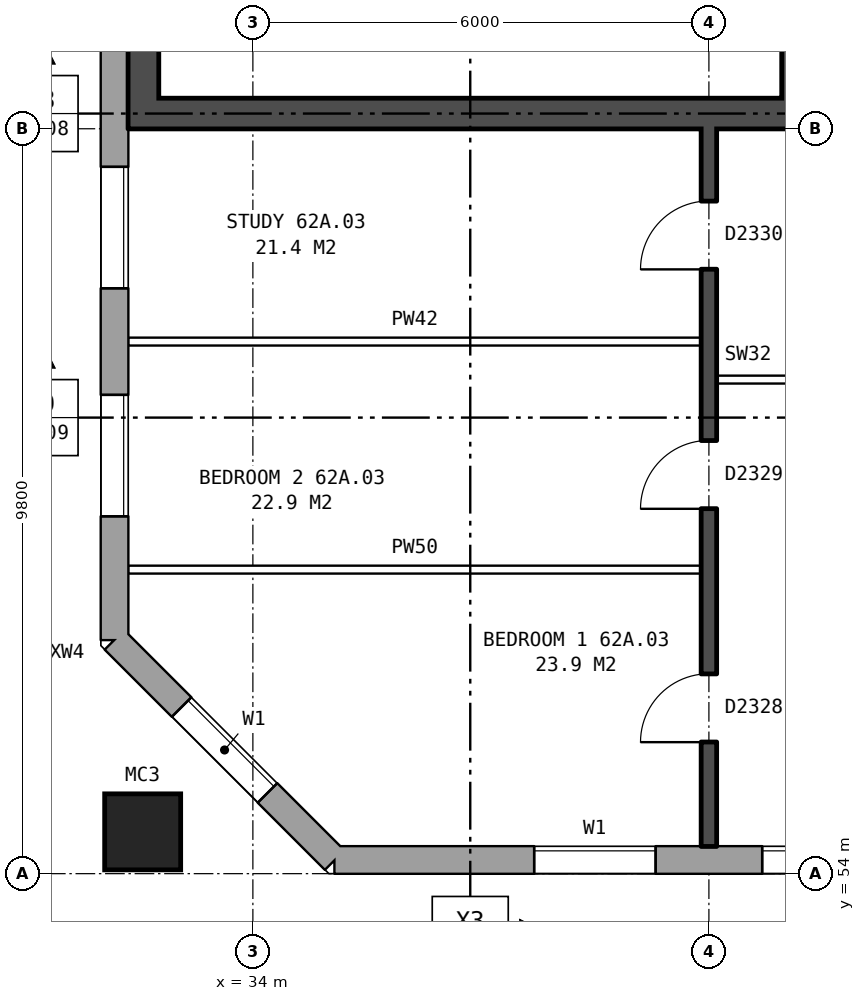
"""IFC4 building model, lengths in metres.
Left out: names, types, materials, properties, quantities, classifications, styles, units other than length and angle.
Written with IfcOpenShell. Run it as: python <this file> out.ifc"""

import sys

from ifc_helpers import new_model, si_unit, direction, frame, frame_2d, origin, origin_2d, place, context, subcontext, project, spatial, rectangle, hollow_rectangle, extrude, element, fill, save


model = new_model("IFC4")
c1 = context("Model", 3, precision=1e-05, world=origin(), true_north=direction((0.0, 1.0)))
c2 = subcontext(c1, "Body", "Model", "MODEL_VIEW")
j1 = project(units=[si_unit("LENGTHUNIT", "METRE"), si_unit("PLANEANGLEUNIT", "RADIAN")], contexts=[c1])
p1 = place(None, origin())
s1 = spatial("IfcSite", under=j1, at=p1, CompositionType="ELEMENT")
p2 = place(p1, origin())
s2 = spatial("IfcBuilding", under=s1, at=p2, CompositionType="ELEMENT")
p3 = place(p2, frame((0.0, 0.0, 221.4)))
s3 = spatial("IfcBuildingStorey", under=s2, at=p3, CompositionType="ELEMENT", Elevation=221.4)
p4 = place(p3, frame((32.55, 54.55, 0.0), z_axis=(0.0, 0.0, 1.0), x_axis=(1.0, 0.0, 0.0)))
e1 = element("IfcColumn", 1, at=p4, inside=s3, PredefinedType="COLUMN", context=c2, shape_type="SweptSolid", body=[
    extrude(hollow_rectangle(XDim=1.0, YDim=1.0, WallThickness=0.055, at=origin_2d()), origin(), (0.0, 0.0, 1.0), 3.1),
])
p5 = place(p3, frame((32.18, 57.075, 0.0), z_axis=(0.0, 0.0, 1.0), x_axis=(0.707106781187, -0.707106781187, 0.0)))
e2 = element("IfcWall", 2, at=p5, inside=s3, PredefinedType="STANDARD", context=c2, shape_type="SweptSolid", body=[
    extrude(rectangle(XDim=4.094, YDim=0.36, at=frame_2d((2.047, 0.0))), origin(), (0.0, 0.0, 1.0), 2.85),
])
p6 = place(p5, frame((1.247, 0.0, 0.8)))
e3 = element("IfcOpeningElement", 3, at=p6, cuts=e2, PredefinedType="OPENING", context=c2, shape_type="SweptSolid", body=[
    extrude(rectangle(XDim=1.6, YDim=1.8, at=frame_2d((0.8, 0.9))), frame((0.0, 0.19, 0.0), z_axis=(0.0, -1.0, 0.0), x_axis=(1.0, 0.0, 0.0)), (0.0, 0.0, 1.0), 0.38),
])
p7 = place(p3, frame((35.075, 54.18, 0.0), z_axis=(0.0, 0.0, 1.0), x_axis=(1.0, 0.0, 0.0)))
e4 = element("IfcWall", 4, at=p7, inside=s3, PredefinedType="STANDARD", context=c2, shape_type="SweptSolid", body=[
    extrude(rectangle(XDim=39.875, YDim=0.36, at=frame_2d((19.938, 0.0))), origin(), (0.0, 0.0, 1.0), 2.85),
])
p8 = place(p7, frame((2.625, 0.0, 0.8)))
e5 = element("IfcOpeningElement", 5, at=p8, cuts=e4, PredefinedType="OPENING", context=c2, shape_type="SweptSolid", body=[
    extrude(rectangle(XDim=1.6, YDim=1.8, at=frame_2d((0.8, 0.9))), frame((0.0, 0.19, 0.0), z_axis=(0.0, -1.0, 0.0), x_axis=(1.0, 0.0, 0.0)), (0.0, 0.0, 1.0), 0.38),
])
p9 = place(p7, frame((5.625, 0.0, 0.8)))
e6 = element("IfcOpeningElement", 6, at=p9, cuts=e4, PredefinedType="OPENING", context=c2, shape_type="SweptSolid", body=[
    extrude(rectangle(XDim=1.6, YDim=1.8, at=frame_2d((0.8, 0.9))), frame((0.0, 0.19, 0.0), z_axis=(0.0, -1.0, 0.0), x_axis=(1.0, 0.0, 0.0)), (0.0, 0.0, 1.0), 0.38),
])
p10 = place(p7, frame((7.525, 0.0, 0.8)))
e7 = element("IfcOpeningElement", 7, at=p10, cuts=e4, PredefinedType="OPENING", context=c2, shape_type="SweptSolid", body=[
    extrude(rectangle(XDim=1.4, YDim=1.8, at=frame_2d((0.7, 0.9))), frame((0.0, 0.19, 0.0), z_axis=(0.0, -1.0, 0.0), x_axis=(1.0, 0.0, 0.0)), (0.0, 0.0, 1.0), 0.38),
])
p11 = place(p7, frame((11.625, 0.0, 0.8)))
e8 = element("IfcOpeningElement", 8, at=p11, cuts=e4, PredefinedType="OPENING", context=c2, shape_type="SweptSolid", body=[
    extrude(rectangle(XDim=1.6, YDim=1.8, at=frame_2d((0.8, 0.9))), frame((0.0, 0.19, 0.0), z_axis=(0.0, -1.0, 0.0), x_axis=(1.0, 0.0, 0.0)), (0.0, 0.0, 1.0), 0.38),
])
p12 = place(p7, frame((14.625, 0.0, 0.8)))
e9 = element("IfcOpeningElement", 9, at=p12, cuts=e4, PredefinedType="OPENING", context=c2, shape_type="SweptSolid", body=[
    extrude(rectangle(XDim=1.6, YDim=1.8, at=frame_2d((0.8, 0.9))), frame((0.0, 0.19, 0.0), z_axis=(0.0, -1.0, 0.0), x_axis=(1.0, 0.0, 0.0)), (0.0, 0.0, 1.0), 0.38),
])
p13 = place(p7, frame((17.625, 0.0, 0.8)))
e10 = element("IfcOpeningElement", 10, at=p13, cuts=e4, PredefinedType="OPENING", context=c2, shape_type="SweptSolid", body=[
    extrude(rectangle(XDim=1.6, YDim=1.8, at=frame_2d((0.8, 0.9))), frame((0.0, 0.19, 0.0), z_axis=(0.0, -1.0, 0.0), x_axis=(1.0, 0.0, 0.0)), (0.0, 0.0, 1.0), 0.38),
])
p14 = place(p7, frame((20.625, 0.0, 0.8)))
e11 = element("IfcOpeningElement", 11, at=p14, cuts=e4, PredefinedType="OPENING", context=c2, shape_type="SweptSolid", body=[
    extrude(rectangle(XDim=1.6, YDim=1.8, at=frame_2d((0.8, 0.9))), frame((0.0, 0.19, 0.0), z_axis=(0.0, -1.0, 0.0), x_axis=(1.0, 0.0, 0.0)), (0.0, 0.0, 1.0), 0.38),
])
p15 = place(p7, frame((23.625, 0.0, 0.8)))
e12 = element("IfcOpeningElement", 12, at=p15, cuts=e4, PredefinedType="OPENING", context=c2, shape_type="SweptSolid", body=[
    extrude(rectangle(XDim=1.6, YDim=1.8, at=frame_2d((0.8, 0.9))), frame((0.0, 0.19, 0.0), z_axis=(0.0, -1.0, 0.0), x_axis=(1.0, 0.0, 0.0)), (0.0, 0.0, 1.0), 0.38),
])
p16 = place(p7, frame((26.075, 0.0, 0.15)))
e13 = element("IfcOpeningElement", 13, at=p16, cuts=e4, PredefinedType="OPENING", context=c2, shape_type="SweptSolid", body=[
    extrude(rectangle(XDim=0.8, YDim=1.5, at=frame_2d((0.4, 0.75))), frame((0.0, 0.19, 0.0), z_axis=(0.0, -1.0, 0.0), x_axis=(1.0, 0.0, 0.0)), (0.0, 0.0, 1.0), 0.38),
])
p17 = place(p7, frame((29.625, 0.0, 0.8)))
e14 = element("IfcOpeningElement", 14, at=p17, cuts=e4, PredefinedType="OPENING", context=c2, shape_type="SweptSolid", body=[
    extrude(rectangle(XDim=1.6, YDim=1.8, at=frame_2d((0.8, 0.9))), frame((0.0, 0.19, 0.0), z_axis=(0.0, -1.0, 0.0), x_axis=(1.0, 0.0, 0.0)), (0.0, 0.0, 1.0), 0.38),
])
p18 = place(p7, frame((32.625, 0.0, 0.8)))
e15 = element("IfcOpeningElement", 15, at=p18, cuts=e4, PredefinedType="OPENING", context=c2, shape_type="SweptSolid", body=[
    extrude(rectangle(XDim=1.6, YDim=1.8, at=frame_2d((0.8, 0.9))), frame((0.0, 0.19, 0.0), z_axis=(0.0, -1.0, 0.0), x_axis=(1.0, 0.0, 0.0)), (0.0, 0.0, 1.0), 0.38),
])
p19 = place(p7, frame((35.625, 0.0, 0.8)))
e16 = element("IfcOpeningElement", 16, at=p19, cuts=e4, PredefinedType="OPENING", context=c2, shape_type="SweptSolid", body=[
    extrude(rectangle(XDim=1.6, YDim=1.8, at=frame_2d((0.8, 0.9))), frame((0.0, 0.19, 0.0), z_axis=(0.0, -1.0, 0.0), x_axis=(1.0, 0.0, 0.0)), (0.0, 0.0, 1.0), 0.38),
])
p20 = place(p7, frame((9.225, 0.0, 1.7)))
e17 = element("IfcOpeningElement", 17, at=p20, cuts=e4, PredefinedType="OPENING", context=c2, shape_type="SweptSolid", body=[
    extrude(rectangle(XDim=0.6, YDim=0.9, at=frame_2d((0.3, 0.45))), frame((0.0, 0.19, 0.0), z_axis=(0.0, -1.0, 0.0), x_axis=(1.0, 0.0, 0.0)), (0.0, 0.0, 1.0), 0.38),
])
p21 = place(p7, frame((28.075, 0.0, 1.65)))
e18 = element("IfcOpeningElement", 18, at=p21, cuts=e4, PredefinedType="OPENING", context=c2, shape_type="SweptSolid", body=[
    extrude(rectangle(XDim=0.6, YDim=0.9, at=frame_2d((0.3, 0.45))), frame((0.0, 0.19, 0.0), z_axis=(0.0, -1.0, 0.0), x_axis=(1.0, 0.0, 0.0)), (0.0, 0.0, 1.0), 0.38),
])
p22 = place(p3, frame((32.18, 82.925, 0.0), z_axis=(0.0, 0.0, 1.0), x_axis=(0.0, -1.0, 0.0)))
e19 = element("IfcWall", 19, at=p22, inside=s3, PredefinedType="STANDARD", context=c2, shape_type="SweptSolid", body=[
    extrude(rectangle(XDim=25.851, YDim=0.36, at=frame_2d((12.925, 0.0))), origin(), (0.0, 0.0, 1.0), 2.85),
])
p23 = place(p22, frame((1.625, 0.0, 0.8)))
e20 = element("IfcOpeningElement", 20, at=p23, cuts=e19, PredefinedType="OPENING", context=c2, shape_type="SweptSolid", body=[
    extrude(rectangle(XDim=1.6, YDim=1.8, at=frame_2d((0.8, 0.9))), frame((0.0, 0.19, 0.0), z_axis=(0.0, -1.0, 0.0), x_axis=(1.0, 0.0, 0.0)), (0.0, 0.0, 1.0), 0.38),
])
p24 = place(p22, frame((4.625, 0.0, 0.8)))
e21 = element("IfcOpeningElement", 21, at=p24, cuts=e19, PredefinedType="OPENING", context=c2, shape_type="SweptSolid", body=[
    extrude(rectangle(XDim=1.6, YDim=1.8, at=frame_2d((0.8, 0.9))), frame((0.0, 0.19, 0.0), z_axis=(0.0, -1.0, 0.0), x_axis=(1.0, 0.0, 0.0)), (0.0, 0.0, 1.0), 0.38),
])
p25 = place(p22, frame((19.625, 0.0, 0.8)))
e22 = element("IfcOpeningElement", 22, at=p25, cuts=e19, PredefinedType="OPENING", context=c2, shape_type="SweptSolid", body=[
    extrude(rectangle(XDim=1.6, YDim=1.8, at=frame_2d((0.8, 0.9))), frame((0.0, 0.19, 0.0), z_axis=(0.0, -1.0, 0.0), x_axis=(1.0, 0.0, 0.0)), (0.0, 0.0, 1.0), 0.38),
])
p26 = place(p22, frame((22.625, 0.0, 0.8)))
e23 = element("IfcOpeningElement", 23, at=p26, cuts=e19, PredefinedType="OPENING", context=c2, shape_type="SweptSolid", body=[
    extrude(rectangle(XDim=1.6, YDim=1.8, at=frame_2d((0.8, 0.9))), frame((0.0, 0.19, 0.0), z_axis=(0.0, -1.0, 0.0), x_axis=(1.0, 0.0, 0.0)), (0.0, 0.0, 1.0), 0.38),
])
p27 = place(p3, frame((41.16, 76.2, 0.0), z_axis=(0.0, 0.0, 1.0), x_axis=(0.0, -1.0, 0.0)))
e24 = element("IfcWall", 24, at=p27, inside=s3, PredefinedType="SHEAR", context=c2, shape_type="SweptSolid", body=[
    extrude(rectangle(XDim=12.4, YDim=0.4, at=frame_2d((6.2, 0.0))), origin(), (0.0, 0.0, 1.0), 2.85),
])
p28 = place(p27, frame((1.325, 0.0, 0.0)))
e25 = element("IfcOpeningElement", 25, at=p28, cuts=e24, PredefinedType="OPENING", context=c2, shape_type="SweptSolid", body=[
    extrude(rectangle(XDim=1.1, YDim=2.1, at=frame_2d((0.55, 1.05))), frame((0.0, 0.21, 0.0), z_axis=(0.0, -1.0, 0.0), x_axis=(1.0, 0.0, 0.0)), (0.0, 0.0, 1.0), 0.42),
])
p29 = place(p27, frame((5.925, 0.0, 0.0)))
e26 = element("IfcOpeningElement", 26, at=p29, cuts=e24, PredefinedType="OPENING", context=c2, shape_type="SweptSolid", body=[
    extrude(rectangle(XDim=0.85, YDim=2.1, at=frame_2d((0.425, 1.05))), frame((0.0, 0.21, 0.0), z_axis=(0.0, -1.0, 0.0), x_axis=(1.0, 0.0, 0.0)), (0.0, 0.0, 1.0), 0.42),
])
p30 = place(p27, frame((9.9, 0.0, 0.0)))
e27 = element("IfcOpeningElement", 27, at=p30, cuts=e24, PredefinedType="OPENING", context=c2, shape_type="SweptSolid", body=[
    extrude(rectangle(XDim=1.1, YDim=2.1, at=frame_2d((0.55, 1.05))), frame((0.0, 0.21, 0.0), z_axis=(0.0, -1.0, 0.0), x_axis=(1.0, 0.0, 0.0)), (0.0, 0.0, 1.0), 0.42),
])
p31 = place(p3, frame((32.56, 76.2, 0.0), z_axis=(0.0, 0.0, 1.0), x_axis=(0.0, -1.0, 0.0)))
e28 = element("IfcWall", 28, at=p31, inside=s3, PredefinedType="SHEAR", context=c2, shape_type="SweptSolid", body=[
    extrude(rectangle(XDim=12.4, YDim=0.4, at=frame_2d((6.2, 0.0))), origin(), (0.0, 0.0, 1.0), 2.85),
])
p32 = place(p3, frame((40.96, 64.0, 0.0), z_axis=(0.0, 0.0, 1.0), x_axis=(-1.0, 0.0, 0.0)))
e29 = element("IfcWall", 29, at=p32, inside=s3, PredefinedType="SHEAR", context=c2, shape_type="SweptSolid", body=[
    extrude(rectangle(XDim=8.2, YDim=0.4, at=frame_2d((4.1, 0.0))), origin(), (0.0, 0.0, 1.0), 2.85),
])
p33 = place(p3, frame((32.36, 58.0, 0.0), z_axis=(0.0, 0.0, 1.0), x_axis=(1.0, 0.0, 0.0)))
e30 = element("IfcWall", 30, at=p33, inside=s3, PredefinedType="PARTITIONING", context=c2, shape_type="SweptSolid", body=[
    extrude(rectangle(XDim=7.54, YDim=0.1, at=frame_2d((3.77, 0.0))), origin(), (0.0, 0.0, 1.0), 2.85),
])
p34 = place(p3, frame((40.1, 60.5, 0.0), z_axis=(0.0, 0.0, 1.0), x_axis=(1.0, 0.0, 0.0)))
e31 = element("IfcWall", 31, at=p34, inside=s3, PredefinedType="PARTITIONING", context=c2, shape_type="SweptSolid", body=[
    extrude(rectangle(XDim=5.8, YDim=0.1, at=frame_2d((2.9, 0.0))), origin(), (0.0, 0.0, 1.0), 2.85),
])
p35 = place(p34, frame((1.3, 0.0, 0.0)))
e32 = element("IfcOpeningElement", 32, at=p35, cuts=e31, PredefinedType="OPENING", context=c2, shape_type="SweptSolid", body=[
    extrude(rectangle(XDim=0.9, YDim=2.1, at=frame_2d((0.45, 1.05))), frame((0.0, 0.06, 0.0), z_axis=(0.0, -1.0, 0.0), x_axis=(1.0, 0.0, 0.0)), (0.0, 0.0, 1.0), 0.12),
])
p36 = place(p34, frame((4.2, 0.0, 0.0)))
e33 = element("IfcOpeningElement", 33, at=p36, cuts=e31, PredefinedType="OPENING", context=c2, shape_type="SweptSolid", body=[
    extrude(rectangle(XDim=0.9, YDim=2.1, at=frame_2d((0.45, 1.05))), frame((0.0, 0.06, 0.0), z_axis=(0.0, -1.0, 0.0), x_axis=(1.0, 0.0, 0.0)), (0.0, 0.0, 1.0), 0.12),
])
p37 = place(p3, frame((32.36, 61.0, 0.0), z_axis=(0.0, 0.0, 1.0), x_axis=(1.0, 0.0, 0.0)))
e34 = element("IfcWall", 34, at=p37, inside=s3, PredefinedType="PARTITIONING", context=c2, shape_type="SweptSolid", body=[
    extrude(rectangle(XDim=7.54, YDim=0.1, at=frame_2d((3.77, 0.0))), origin(), (0.0, 0.0, 1.0), 2.85),
])
p38 = place(p3, frame((40.0, 54.36, 0.0), z_axis=(0.0, 0.0, 1.0), x_axis=(0.0, 1.0, 0.0)))
e35 = element("IfcWall", 35, at=p38, inside=s3, PredefinedType="SOLIDWALL", context=c2, shape_type="SweptSolid", body=[
    extrude(rectangle(XDim=9.44, YDim=0.2, at=frame_2d((4.72, 0.0))), origin(), (0.0, 0.0, 1.0), 2.85),
])
p39 = place(p38, frame((1.37, 0.0, 0.0)))
e36 = element("IfcOpeningElement", 36, at=p39, cuts=e35, PredefinedType="OPENING", context=c2, shape_type="SweptSolid", body=[
    extrude(rectangle(XDim=0.9, YDim=2.1, at=frame_2d((0.45, 1.05))), frame((0.0, 0.11, 0.0), z_axis=(0.0, -1.0, 0.0), x_axis=(1.0, 0.0, 0.0)), (0.0, 0.0, 1.0), 0.22),
])
p40 = place(p38, frame((4.44, 0.0, 0.0)))
e37 = element("IfcOpeningElement", 37, at=p40, cuts=e35, PredefinedType="OPENING", context=c2, shape_type="SweptSolid", body=[
    extrude(rectangle(XDim=0.9, YDim=2.1, at=frame_2d((0.45, 1.05))), frame((0.0, 0.11, 0.0), z_axis=(0.0, -1.0, 0.0), x_axis=(1.0, 0.0, 0.0)), (0.0, 0.0, 1.0), 0.22),
])
p41 = place(p38, frame((7.59, 0.0, 0.0)))
e38 = element("IfcOpeningElement", 38, at=p41, cuts=e35, PredefinedType="OPENING", context=c2, shape_type="SweptSolid", body=[
    extrude(rectangle(XDim=0.9, YDim=2.1, at=frame_2d((0.45, 1.05))), frame((0.0, 0.11, 0.0), z_axis=(0.0, -1.0, 0.0), x_axis=(1.0, 0.0, 0.0)), (0.0, 0.0, 1.0), 0.22),
])
p42 = place(p6, origin())
e39 = element("IfcWindow", 39, at=p42, inside=s3, PartitioningType="SINGLE_PANEL", PredefinedType="WINDOW", context=c2, shape_type="SweptSolid", body=[
    extrude(rectangle(XDim=1.6, YDim=1.8, at=frame_2d((0.8, 0.9))), frame((0.0, 0.15, 0.0), z_axis=(0.0, -1.0, 0.0), x_axis=(1.0, 0.0, 0.0)), (0.0, 0.0, 1.0), 0.06),
])
fill(e3, e39)
p43 = place(p8, origin())
e40 = element("IfcWindow", 40, at=p43, inside=s3, PartitioningType="SINGLE_PANEL", PredefinedType="WINDOW", context=c2, shape_type="SweptSolid", body=[
    extrude(rectangle(XDim=1.6, YDim=1.8, at=frame_2d((0.8, 0.9))), frame((0.0, 0.15, 0.0), z_axis=(0.0, -1.0, 0.0), x_axis=(1.0, 0.0, 0.0)), (0.0, 0.0, 1.0), 0.06),
])
fill(e5, e40)
p44 = place(p9, origin())
e41 = element("IfcWindow", 41, at=p44, inside=s3, PartitioningType="SINGLE_PANEL", PredefinedType="WINDOW", context=c2, shape_type="SweptSolid", body=[
    extrude(rectangle(XDim=1.6, YDim=1.8, at=frame_2d((0.8, 0.9))), frame((0.0, 0.15, 0.0), z_axis=(0.0, -1.0, 0.0), x_axis=(1.0, 0.0, 0.0)), (0.0, 0.0, 1.0), 0.06),
])
fill(e6, e41)
p45 = place(p25, origin())
e42 = element("IfcWindow", 42, at=p45, inside=s3, PartitioningType="SINGLE_PANEL", PredefinedType="WINDOW", context=c2, shape_type="SweptSolid", body=[
    extrude(rectangle(XDim=1.6, YDim=1.8, at=frame_2d((0.8, 0.9))), frame((0.0, 0.15, 0.0), z_axis=(0.0, -1.0, 0.0), x_axis=(1.0, 0.0, 0.0)), (0.0, 0.0, 1.0), 0.06),
])
fill(e22, e42)
p46 = place(p26, origin())
e43 = element("IfcWindow", 43, at=p46, inside=s3, PartitioningType="SINGLE_PANEL", PredefinedType="WINDOW", context=c2, shape_type="SweptSolid", body=[
    extrude(rectangle(XDim=1.6, YDim=1.8, at=frame_2d((0.8, 0.9))), frame((0.0, 0.15, 0.0), z_axis=(0.0, -1.0, 0.0), x_axis=(1.0, 0.0, 0.0)), (0.0, 0.0, 1.0), 0.06),
])
fill(e23, e43)
p47 = place(p39, origin())
e44 = element("IfcDoor", 44, at=p47, inside=s3, OperationType="SINGLE_SWING_LEFT", PredefinedType="DOOR", context=c2, shape_type="SweptSolid", body=[
    extrude(rectangle(XDim=0.9, YDim=2.1, at=frame_2d((0.45, 1.05))), frame((0.0, 0.025, 0.0), z_axis=(0.0, -1.0, 0.0), x_axis=(1.0, 0.0, 0.0)), (0.0, 0.0, 1.0), 0.05),
])
fill(e36, e44)
p48 = place(p40, origin())
e45 = element("IfcDoor", 45, at=p48, inside=s3, OperationType="SINGLE_SWING_LEFT", PredefinedType="DOOR", context=c2, shape_type="SweptSolid", body=[
    extrude(rectangle(XDim=0.9, YDim=2.1, at=frame_2d((0.45, 1.05))), frame((0.0, 0.025, 0.0), z_axis=(0.0, -1.0, 0.0), x_axis=(1.0, 0.0, 0.0)), (0.0, 0.0, 1.0), 0.05),
])
fill(e37, e45)
p49 = place(p41, origin())
e46 = element("IfcDoor", 46, at=p49, inside=s3, OperationType="SINGLE_SWING_LEFT", PredefinedType="DOOR", context=c2, shape_type="SweptSolid", body=[
    extrude(rectangle(XDim=0.9, YDim=2.1, at=frame_2d((0.45, 1.05))), frame((0.0, 0.025, 0.0), z_axis=(0.0, -1.0, 0.0), x_axis=(1.0, 0.0, 0.0)), (0.0, 0.0, 1.0), 0.05),
])
fill(e38, e46)
save(model, sys.argv[1])
